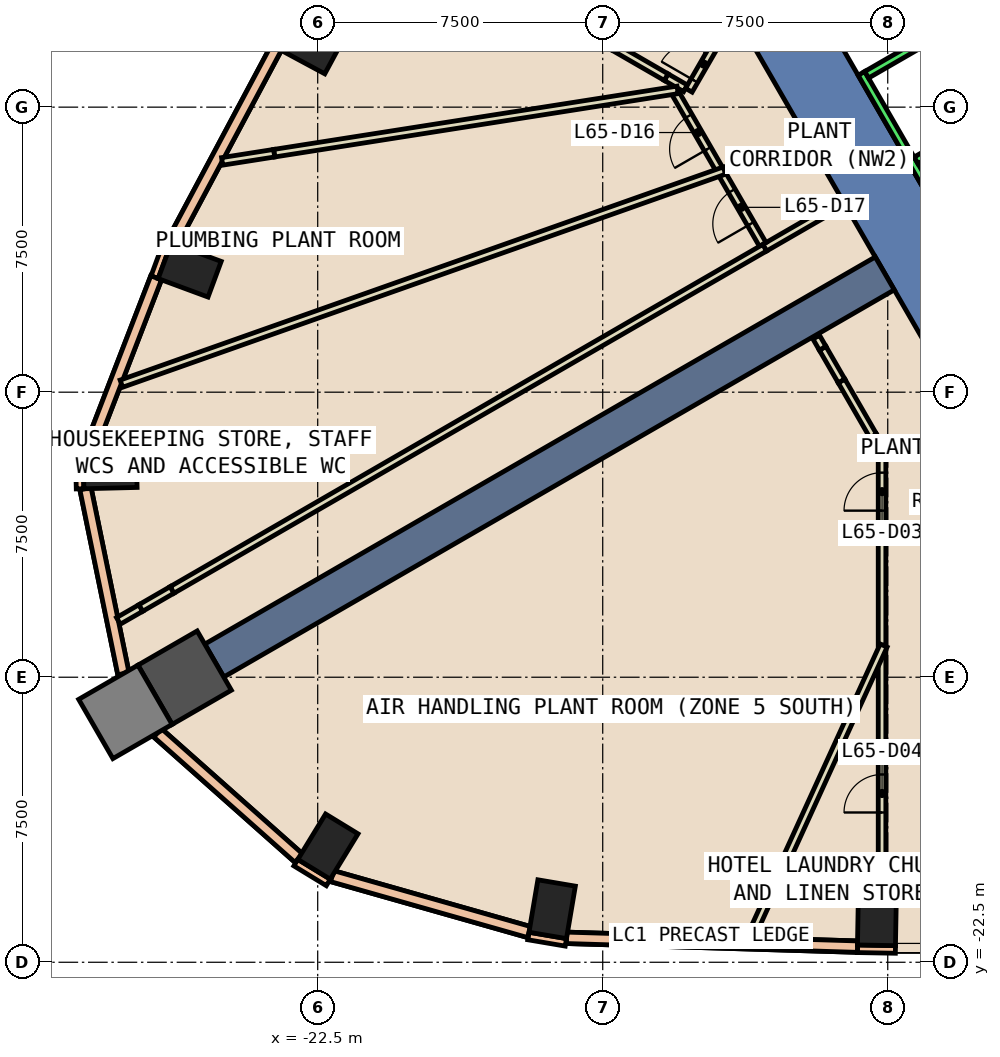
"""IFC4 building model, lengths in metres.
Left out: names, types, materials, properties, quantities, classifications, styles, units other than length and angle.
Written with IfcOpenShell. Run it as: python <this file> out.ifc"""

import sys

from ifc_helpers import new_model, si_unit, direction, frame, frame_2d, origin, origin_2d, place, context, subcontext, project, spatial, polyline, rectangle, outline, extrude, element, fill, save


model = new_model("IFC4")
c1 = context("Model", 3, precision=1e-05, world=origin(), true_north=direction((0.0, 1.0)))
c2 = subcontext(c1, "Body", "Model", "MODEL_VIEW")
j1 = project(units=[si_unit("LENGTHUNIT", "METRE"), si_unit("PLANEANGLEUNIT", "RADIAN")], contexts=[c1])
p1 = place(None, origin())
s1 = spatial("IfcSite", under=j1, at=p1, CompositionType="ELEMENT")
p2 = place(p1, origin())
s2 = spatial("IfcBuilding", under=s1, at=p2, CompositionType="ELEMENT")
p3 = place(p2, frame((0.0, 0.0, 281.0)))
s3 = spatial("IfcBuildingStorey", under=s2, at=p3, CompositionType="ELEMENT", Elevation=281.0)
for number, where, z_axis, x_axis in (
    (1, (-16.33, -21.104, -0.6), (0.0, 0.0, 1.0), (-0.986, 0.167, 0.0)),
    (2, (-7.784, -21.354, -0.6), (0.0, 0.0, 1.0), (-1.0, 0.018, 0.0)),
    (3, (-22.693, 1.649, -0.6), (0.0, 0.0, 1.0), (0.474, 0.881, 0.0)),
    (4, (-25.869, -4.285, -0.6), (0.0, 0.0, 1.0), (0.347, 0.938, 0.0)),
    (5, (-27.965, -9.524, -0.6), (0.0, 0.0, 1.0), (-0.025, 1.0, 0.0)),
):
    element("IfcColumn", number, at=place(p3, frame(where, z_axis=z_axis, x_axis=x_axis)), inside=s3, PredefinedType="COLUMN", context=c2, shape_type="SweptSolid", body=[
        extrude(rectangle(XDim=1.0, YDim=1.4, at=origin_2d()), origin(), (0.0, 0.0, 1.0), 5.4),
    ])
p4 = place(p3, frame((-26.001, -15.012, -0.6), z_axis=(0.0, 0.0, 1.0), x_axis=(0.866025403784, 0.5, 0.0)))
e6 = element("IfcColumn", 6, at=p4, inside=s3, PredefinedType="COLUMN", context=c2, shape_type="SweptSolid", body=[
    extrude(rectangle(XDim=1.8, YDim=1.8, at=origin_2d()), origin(), (0.0, 0.0, 1.0), 5.4),
])
p5 = place(p3, frame((-22.231, -19.457, -0.6), z_axis=(0.0, 0.0, 1.0), x_axis=(-0.853341581839, 0.521352227103, 0.0)))
e7 = element("IfcColumn", 7, at=p5, inside=s3, PredefinedType="COLUMN", context=c2, shape_type="SweptSolid", body=[
    extrude(rectangle(XDim=1.0, YDim=1.4, at=origin_2d()), origin(), (0.0, 0.0, 1.0), 5.4),
])
p6 = place(p3, frame((-27.56, -15.912, -0.6), z_axis=(0.0, 0.0, 1.0), x_axis=(0.866025403784, 0.5, 0.0)))
e8 = element("IfcColumn", 8, at=p6, inside=s3, PredefinedType="COLUMN", context=c2, shape_type="SweptSolid", body=[
    extrude(rectangle(XDim=1.8, YDim=1.8, at=origin_2d()), origin(), (0.0, 0.0, 1.0), 5.4),
])
p7 = place(p3, frame((0.0, 0.0, -0.6)))
e9 = element("IfcWall", 9, at=p7, inside=s3, PredefinedType="SHEAR", context=c2, shape_type="SweptSolid", body=[
    extrude(outline(polyline([(-11.547, 2.5), (-5.774, -7.5), (-4.619, -5.5), (-9.238, 2.5), (-11.547, 2.5)])), origin(), (0.0, 0.0, 1.0), 5.4),
])
p8 = place(p3, frame((-7.578, -4.375, 0.0), z_axis=(0.0, 0.0, 1.0), x_axis=(-0.866020754303, -0.500008053052, 0.0)))
e10 = element("IfcWall", 10, at=p8, inside=s3, PredefinedType="SHEAR", context=c2, shape_type="SweptSolid", body=[
    extrude(rectangle(XDim=20.374, YDim=1.0, at=frame_2d((10.187, 0.0))), origin(), (0.0, 0.0, 1.0), 4.8),
])
p9 = place(p3, frame((-26.446, -3.539, 0.0), z_axis=(0.0, 0.0, 1.0), x_axis=(-0.346892928577, -0.937904737222, 0.0)))
e11 = element("IfcWall", 11, at=p9, inside=s3, PredefinedType="STANDARD", context=c2, shape_type="SweptSolid", body=[
    extrude(rectangle(XDim=1.0, YDim=0.2, at=frame_2d((0.5, 0.0))), origin(), (0.0, 0.0, 1.0), 4.8),
])
for number, where, z_axis, x_axis in (
    (12, (-16.956, -21.809, 0.0), (0.0, 0.0, 1.0), (0.986, -0.167, 0.0)),
    (13, (-8.298, -22.145, 0.0), (0.0, 0.0, 1.0), (1.0, -0.018, 0.0)),
):
    element("IfcWall", number, at=place(p3, frame(where, z_axis=z_axis, x_axis=x_axis)), inside=s3, PredefinedType="STANDARD", context=c2, shape_type="SweptSolid", body=[
        extrude(rectangle(XDim=1.0, YDim=0.2, at=frame_2d((0.5, 0.0))), origin(), (0.0, 0.0, 1.0), 4.8),
    ])
p10 = place(p3, frame((-28.777, -9.044, 0.0), z_axis=(0.0, 0.0, 1.0), x_axis=(0.024186470916, -0.999707464524, 0.0)))
e14 = element("IfcWall", 14, at=p10, inside=s3, PredefinedType="STANDARD", context=c2, shape_type="SweptSolid", body=[
    extrude(rectangle(XDim=0.999, YDim=0.2, at=frame_2d((0.5, 0.0))), origin(), (0.0, 0.0, 1.0), 4.8),
])
p11 = place(p3, frame((-23.075, -19.879, 0.0), z_axis=(0.0, 0.0, 1.0), x_axis=(0.853679739553, -0.520798331677, 0.0)))
e15 = element("IfcWall", 15, at=p11, inside=s3, PredefinedType="STANDARD", context=c2, shape_type="SweptSolid", body=[
    extrude(rectangle(XDim=1.0, YDim=0.2, at=frame_2d((0.5, 0.0))), origin(), (0.0, 0.0, 1.0), 4.8),
])
p12 = place(p3, frame((-15.951, -21.857, 0.0), z_axis=(0.0, 0.0, 1.0), x_axis=(0.999540359891, -0.030316149968, 0.0)))
e16 = element("IfcWall", 16, at=p12, inside=s3, PredefinedType="STANDARD", context=c2, shape_type="SweptSolid", body=[
    extrude(rectangle(XDim=7.658, YDim=0.3, at=frame_2d((3.829, 0.0))), origin(), (0.0, 0.0, 1.0), 1.2),
])
p13 = place(p3, frame((-15.951, -21.857, 4.0), z_axis=(0.0, 0.0, 1.0), x_axis=(0.999540359891, -0.030316149968, 0.0)))
e17 = element("IfcWall", 17, at=p13, inside=s3, PredefinedType="STANDARD", context=c2, shape_type="SweptSolid", body=[
    extrude(rectangle(XDim=7.658, YDim=0.3, at=frame_2d((3.829, 0.0))), origin(), (0.0, 0.0, 1.0), 0.8),
])
p14 = place(p3, frame((-23.588, 1.565, 0.0), z_axis=(0.0, 0.0, 1.0), x_axis=(-0.470796778214, -0.882241686628, 0.0)))
e18 = element("IfcWall", 18, at=p14, inside=s3, PredefinedType="STANDARD", context=c2, shape_type="SweptSolid", body=[
    extrude(rectangle(XDim=5.833, YDim=0.3, at=frame_2d((2.917, 0.0))), origin(), (0.0, 0.0, 1.0), 1.2),
])
p15 = place(p3, frame((-23.588, 1.565, 4.0), z_axis=(0.0, 0.0, 1.0), x_axis=(-0.470796778214, -0.882241686628, 0.0)))
e19 = element("IfcWall", 19, at=p15, inside=s3, PredefinedType="STANDARD", context=c2, shape_type="SweptSolid", body=[
    extrude(rectangle(XDim=5.833, YDim=0.3, at=frame_2d((2.917, 0.0))), origin(), (0.0, 0.0, 1.0), 0.8),
])
p16 = place(p3, frame((-26.752, -4.491, 0.0), z_axis=(0.0, 0.0, 1.0), x_axis=(-0.360267544186, -0.932849021335, 0.0)))
e20 = element("IfcWall", 20, at=p16, inside=s3, PredefinedType="STANDARD", context=c2, shape_type="SweptSolid", body=[
    extrude(rectangle(XDim=4.875, YDim=0.3, at=frame_2d((2.437, 0.0))), origin(), (0.0, 0.0, 1.0), 1.2),
])
p17 = place(p3, frame((-26.752, -4.491, 4.0), z_axis=(0.0, 0.0, 1.0), x_axis=(-0.360267544186, -0.932849021335, 0.0)))
e21 = element("IfcWall", 21, at=p17, inside=s3, PredefinedType="STANDARD", context=c2, shape_type="SweptSolid", body=[
    extrude(rectangle(XDim=4.875, YDim=0.3, at=frame_2d((2.437, 0.0))), origin(), (0.0, 0.0, 1.0), 0.8),
])
p18 = place(p3, frame((-28.611, -10.039, 0.0), z_axis=(0.0, 0.0, 1.0), x_axis=(0.200924793816, -0.979606669654, 0.0)))
e22 = element("IfcWall", 22, at=p18, inside=s3, PredefinedType="STANDARD", context=c2, shape_type="SweptSolid", body=[
    extrude(rectangle(XDim=4.967, YDim=0.3, at=frame_2d((2.484, 0.0))), origin(), (0.0, 0.0, 1.0), 1.2),
])
p19 = place(p3, frame((-28.611, -10.039, 4.0), z_axis=(0.0, 0.0, 1.0), x_axis=(0.200924793816, -0.979606669654, 0.0)))
e23 = element("IfcWall", 23, at=p19, inside=s3, PredefinedType="STANDARD", context=c2, shape_type="SweptSolid", body=[
    extrude(rectangle(XDim=4.967, YDim=0.3, at=frame_2d((2.484, 0.0))), origin(), (0.0, 0.0, 1.0), 0.8),
])
p20 = place(p3, frame((-26.714, -16.462, 0.0), z_axis=(0.0, 0.0, 1.0), x_axis=(0.747938022937, -0.663768569492, 0.0)))
e24 = element("IfcWall", 24, at=p20, inside=s3, PredefinedType="STANDARD", context=c2, shape_type="SweptSolid", body=[
    extrude(rectangle(XDim=4.966, YDim=0.3, at=frame_2d((2.483, 0.0))), origin(), (0.0, 0.0, 1.0), 1.2),
])
p21 = place(p3, frame((-26.714, -16.462, 4.0), z_axis=(0.0, 0.0, 1.0), x_axis=(0.747938022937, -0.663768569492, 0.0)))
e25 = element("IfcWall", 25, at=p21, inside=s3, PredefinedType="STANDARD", context=c2, shape_type="SweptSolid", body=[
    extrude(rectangle(XDim=4.966, YDim=0.3, at=frame_2d((2.483, 0.0))), origin(), (0.0, 0.0, 1.0), 0.8),
])
p22 = place(p3, frame((-22.12, -20.234, 0.0), z_axis=(0.0, 0.0, 1.0), x_axis=(0.961984350903, -0.27310457451, 0.0)))
e26 = element("IfcWall", 26, at=p22, inside=s3, PredefinedType="STANDARD", context=c2, shape_type="SweptSolid", body=[
    extrude(rectangle(XDim=5.387, YDim=0.3, at=frame_2d((2.693, 0.0))), origin(), (0.0, 0.0, 1.0), 1.2),
])
p23 = place(p3, frame((-22.12, -20.234, 4.0), z_axis=(0.0, 0.0, 1.0), x_axis=(0.961984350903, -0.27310457451, 0.0)))
e27 = element("IfcWall", 27, at=p23, inside=s3, PredefinedType="STANDARD", context=c2, shape_type="SweptSolid", body=[
    extrude(rectangle(XDim=5.387, YDim=0.3, at=frame_2d((2.693, 0.0))), origin(), (0.0, 0.0, 1.0), 0.8),
])
p24 = place(p3, frame((-7.65, -14.157, 0.0), z_axis=(0.0, 0.0, 1.0), x_axis=(0.0, 1.0, 0.0)))
e28 = element("IfcWall", 28, at=p24, inside=s3, PredefinedType="PARTITIONING", context=c2, shape_type="SweptSolid", body=[
    extrude(rectangle(XDim=5.206, YDim=0.2, at=frame_2d((2.603, 0.0))), origin(), (0.0, 0.0, 1.0), 4.8),
])
p25 = place(p24, frame((3.54, 0.0, 0.0)))
e29 = element("IfcOpeningElement", 29, at=p25, cuts=e28, PredefinedType="OPENING", context=c2, shape_type="SweptSolid", body=[
    extrude(rectangle(XDim=1.0, YDim=2.1, at=frame_2d((0.5, 1.05))), frame((0.0, 0.11, 0.0), z_axis=(0.0, -1.0, 0.0), x_axis=(1.0, 0.0, 0.0)), (0.0, 0.0, 1.0), 0.22),
])
p26 = place(p3, frame((-7.7, -8.965, 0.0), z_axis=(0.0, 0.0, 1.0), x_axis=(-0.49946991135, 0.866331234376, 0.0)))
e30 = element("IfcWall", 30, at=p26, inside=s3, PredefinedType="PARTITIONING", context=c2, shape_type="SweptSolid", body=[
    extrude(rectangle(XDim=0.363, YDim=0.2, at=frame_2d((0.181, 0.0))), origin(), (0.0, 0.0, 1.0), 2.4),
])
p27 = place(p3, frame((-7.65, -20.636, 0.0), z_axis=(0.0, 0.0, 1.0), x_axis=(0.0, 1.0, 0.0)))
e31 = element("IfcWall", 31, at=p27, inside=s3, PredefinedType="PARTITIONING", context=c2, shape_type="SweptSolid", body=[
    extrude(rectangle(XDim=6.279, YDim=0.2, at=frame_2d((3.14, 0.0))), origin(), (0.0, 0.0, 1.0), 4.8),
])
p28 = place(p27, frame((2.077, 0.0, 0.0)))
e32 = element("IfcOpeningElement", 32, at=p28, cuts=e31, PredefinedType="OPENING", context=c2, shape_type="SweptSolid", body=[
    extrude(rectangle(XDim=1.0, YDim=2.1, at=frame_2d((0.5, 1.05))), frame((0.0, 0.11, 0.0), z_axis=(0.0, -1.0, 0.0), x_axis=(1.0, 0.0, 0.0)), (0.0, 0.0, 1.0), 0.22),
])
p29 = place(p3, frame((-7.608, -14.166, 0.0), z_axis=(0.0, 0.0, 1.0), x_axis=(-0.415367833022, -0.909653540251, 0.0)))
e33 = element("IfcWall", 33, at=p29, inside=s3, PredefinedType="PARTITIONING", context=c2, shape_type="SweptSolid", body=[
    extrude(rectangle(XDim=7.273, YDim=0.2, at=frame_2d((3.636, 0.0))), origin(), (0.0, 0.0, 1.0), 4.8),
])
p30 = place(p3, frame((-8.66, -2.5, 0.0), z_axis=(0.0, 0.0, 1.0), x_axis=(-0.866100915363, -0.499869187296, 0.0)))
e34 = element("IfcWall", 34, at=p30, inside=s3, PredefinedType="PARTITIONING", context=c2, shape_type="SweptSolid", body=[
    extrude(rectangle(XDim=2.401, YDim=0.2, at=frame_2d((1.2, 0.0))), origin(), (0.0, 0.0, 1.0), 4.8),
])
p31 = place(p3, frame((-27.744, -13.518, 0.0), z_axis=(0.0, 0.0, 1.0), x_axis=(0.866316887664, 0.499494794916, 0.0)))
e35 = element("IfcWall", 35, at=p31, inside=s3, PredefinedType="PARTITIONING", context=c2, shape_type="SweptSolid", body=[
    extrude(rectangle(XDim=0.681, YDim=0.2, at=frame_2d((0.34, 0.0))), origin(), (0.0, 0.0, 1.0), 4.8),
])
p32 = place(p3, frame((-13.331, 0.789, 0.0), z_axis=(0.0, 0.0, 1.0), x_axis=(0.866399552997, -0.499351393877, 0.0)))
e36 = element("IfcWall", 36, at=p32, inside=s3, PredefinedType="PARTITIONING", context=c2, shape_type="SweptSolid", body=[
    extrude(rectangle(XDim=0.589, YDim=0.2, at=frame_2d((0.294, 0.0))), origin(), (0.0, 0.0, 1.0), 4.8),
])
p33 = place(p3, frame((-12.734, 0.445, 0.0), z_axis=(0.0, 0.0, 1.0), x_axis=(0.500083740326, 0.865977050886, 0.0)))
e37 = element("IfcWall", 37, at=p33, inside=s3, PredefinedType="PARTITIONING", context=c2, shape_type="SweptSolid", body=[
    extrude(rectangle(XDim=2.203, YDim=0.2, at=frame_2d((1.102, 0.0))), origin(), (0.0, 0.0, 1.0), 4.8),
])
p34 = place(p33, frame((0.292, 0.0, 0.0)))
e38 = element("IfcOpeningElement", 38, at=p34, cuts=e37, PredefinedType="OPENING", context=c2, shape_type="SweptSolid", body=[
    extrude(rectangle(XDim=1.0, YDim=2.1, at=frame_2d((0.5, 1.05))), frame((0.0, 0.11, 0.0), z_axis=(0.0, -1.0, 0.0), x_axis=(1.0, 0.0, 0.0)), (0.0, 0.0, 1.0), 0.22),
])
p35 = place(p3, frame((-13.331, 0.79, 0.0), z_axis=(0.0, 0.0, 1.0), x_axis=(-0.866003733444, 0.500037532253, 0.0)))
e39 = element("IfcWall", 39, at=p35, inside=s3, PredefinedType="PARTITIONING", context=c2, shape_type="SweptSolid", body=[
    extrude(rectangle(XDim=1.61, YDim=0.2, at=frame_2d((0.805, 0.0))), origin(), (0.0, 0.0, 1.0), 4.8),
])
p36 = place(p3, frame((-11.893, -1.702, 0.0), z_axis=(0.0, 0.0, 1.0), x_axis=(-0.499941887998, 0.866058952165, 0.0)))
e40 = element("IfcWall", 40, at=p36, inside=s3, PredefinedType="PARTITIONING", context=c2, shape_type="SweptSolid", body=[
    extrude(rectangle(XDim=2.472, YDim=0.2, at=frame_2d((1.236, 0.0))), origin(), (0.0, 0.0, 1.0), 4.8),
])
p37 = place(p36, frame((0.694, 0.0, 0.0)))
e41 = element("IfcOpeningElement", 41, at=p37, cuts=e40, PredefinedType="OPENING", context=c2, shape_type="SweptSolid", body=[
    extrude(rectangle(XDim=1.0, YDim=2.1, at=frame_2d((0.5, 1.05))), frame((0.0, 0.11, 0.0), z_axis=(0.0, -1.0, 0.0), x_axis=(1.0, 0.0, 0.0)), (0.0, 0.0, 1.0), 0.22),
])
p38 = place(p3, frame((-10.789, -3.613, 0.0), z_axis=(0.0, 0.0, 1.0), x_axis=(-0.500207565094, 0.865905532852, 0.0)))
e42 = element("IfcWall", 42, at=p38, inside=s3, PredefinedType="PARTITIONING", context=c2, shape_type="SweptSolid", body=[
    extrude(rectangle(XDim=2.207, YDim=0.2, at=frame_2d((1.104, 0.0))), origin(), (0.0, 0.0, 1.0), 4.8),
])
p39 = place(p38, frame((0.628, 0.0, 0.0)))
e43 = element("IfcOpeningElement", 43, at=p39, cuts=e42, PredefinedType="OPENING", context=c2, shape_type="SweptSolid", body=[
    extrude(rectangle(XDim=1.0, YDim=2.1, at=frame_2d((0.5, 1.05))), frame((0.0, 0.11, 0.0), z_axis=(0.0, -1.0, 0.0), x_axis=(1.0, 0.0, 0.0)), (0.0, 0.0, 1.0), 0.22),
])
p40 = place(p3, frame((-13.03, 0.454, 0.0), z_axis=(0.0, 0.0, 1.0), x_axis=(-0.987908611797, -0.155037333369, 0.0)))
e44 = element("IfcWall", 44, at=p40, inside=s3, PredefinedType="PARTITIONING", context=c2, shape_type="SweptSolid", body=[
    extrude(rectangle(XDim=10.746, YDim=0.2, at=frame_2d((5.373, 0.0))), origin(), (0.0, 0.0, 1.0), 4.8),
])
p41 = place(p3, frame((-11.798, -1.669, 0.0), z_axis=(0.0, 0.0, 1.0), x_axis=(-0.942869217573, -0.333163081018, 0.0)))
e45 = element("IfcWall", 45, at=p41, inside=s3, PredefinedType="PARTITIONING", context=c2, shape_type="SweptSolid", body=[
    extrude(rectangle(XDim=16.829, YDim=0.2, at=frame_2d((8.415, 0.0))), origin(), (0.0, 0.0, 1.0), 4.8),
])
p42 = place(p3, frame((-7.881, -8.651, 0.0), z_axis=(0.0, 0.0, 1.0), x_axis=(-0.499848974954, 0.866112580579, 0.0)))
e46 = element("IfcWall", 46, at=p42, inside=s3, PredefinedType="PARTITIONING", context=c2, shape_type="SweptSolid", body=[
    extrude(rectangle(XDim=1.67, YDim=0.2, at=frame_2d((0.835, 0.0))), origin(), (0.0, 0.0, 1.0), 4.8),
])
p43 = place(p3, frame((-8.716, -7.204, 0.0), z_axis=(0.0, 0.0, 1.0), x_axis=(-0.500183410155, 0.865919485983, 0.0)))
e47 = element("IfcWall", 47, at=p43, inside=s3, PredefinedType="PARTITIONING", context=c2, shape_type="SweptSolid", body=[
    extrude(rectangle(XDim=0.993, YDim=0.2, at=frame_2d((0.497, 0.0))), origin(), (0.0, 0.0, 1.0), 2.4),
])
p44 = place(p3, frame((-9.213, -6.344, 0.0), z_axis=(0.0, 0.0, 1.0), x_axis=(-0.500097243556, 0.865969252911, 0.0)))
e48 = element("IfcWall", 48, at=p44, inside=s3, PredefinedType="PARTITIONING", context=c2, shape_type="SweptSolid", body=[
    extrude(rectangle(XDim=0.338, YDim=0.2, at=frame_2d((0.169, 0.0))), origin(), (0.0, 0.0, 1.0), 4.8),
])
p45 = place(p3, frame((-10.629, -20.782, 0.0), z_axis=(0.0, 0.0, 1.0), x_axis=(-0.415333382395, -0.909669270377, 0.0)))
e49 = element("IfcWall", 49, at=p45, inside=s3, PredefinedType="PARTITIONING", context=c2, shape_type="SweptSolid", body=[
    extrude(rectangle(XDim=1.177, YDim=0.2, at=frame_2d((0.589, 0.0))), origin(), (0.0, 0.0, 1.0), 2.4),
])
p46 = place(p3, frame((-27.154, -13.178, 0.0), z_axis=(0.0, 0.0, 1.0), x_axis=(0.865607892982, 0.500722453668, 0.0)))
e50 = element("IfcWall", 50, at=p46, inside=s3, PredefinedType="PARTITIONING", context=c2, shape_type="SweptSolid", body=[
    extrude(rectangle(XDim=0.951, YDim=0.2, at=frame_2d((0.475, 0.0))), origin(), (0.0, 0.0, 1.0), 2.4),
])
p47 = place(p3, frame((-26.331, -12.702, 0.0), z_axis=(0.0, 0.0, 1.0), x_axis=(0.866028192525, 0.499995169729, 0.0)))
e51 = element("IfcWall", 51, at=p47, inside=s3, PredefinedType="PARTITIONING", context=c2, shape_type="SweptSolid", body=[
    extrude(rectangle(XDim=18.004, YDim=0.2, at=frame_2d((9.002, 0.0))), origin(), (0.0, 0.0, 1.0), 4.8),
])
p48 = place(p3, frame((-23.646, -1.212, 0.0), z_axis=(0.0, 0.0, 1.0), x_axis=(-0.987862829639, -0.155328779745, 0.0)))
e52 = element("IfcWall", 52, at=p48, inside=s3, PredefinedType="PARTITIONING", context=c2, shape_type="SweptSolid", body=[
    extrude(rectangle(XDim=1.385, YDim=0.2, at=frame_2d((0.692, 0.0))), origin(), (0.0, 0.0, 1.0), 2.4),
])
p49 = place(p3, frame((-8.192, 0.888, 0.0), z_axis=(0.0, 0.0, 1.0), x_axis=(0.500034260056, -0.866005622828, 0.0)))
e53 = element("IfcWall", 53, at=p49, inside=s3, PredefinedType="STANDARD", context=c2, shape_type="SweptSolid", body=[
    extrude(rectangle(XDim=5.399, YDim=0.2, at=frame_2d((2.7, 0.0))), origin(), (0.0, 0.0, 1.0), 4.8),
])
for number, where, z_axis, x_axis in (
    (54, (-5.977, 2.052, 0.0), (0.0, 0.0, 1.0), (-0.866, -0.5, 0.0)),
    (55, (-4.677, -0.2, 0.0), (0.0, 0.0, 1.0), (-0.866, -0.5, 0.0)),
):
    element("IfcWall", number, at=place(p3, frame(where, z_axis=z_axis, x_axis=x_axis)), inside=s3, PredefinedType="STANDARD", context=c2, shape_type="SweptSolid", body=[
        extrude(rectangle(XDim=2.399, YDim=0.2, at=frame_2d((1.2, 0.0))), origin(), (0.0, 0.0, 1.0), 4.8),
    ])
p50 = place(p25, origin())
e56 = element("IfcDoor", 56, at=p50, inside=s3, OperationType="SINGLE_SWING_RIGHT", PredefinedType="DOOR", context=c2, shape_type="SweptSolid", body=[
    extrude(rectangle(XDim=1.0, YDim=2.1, at=frame_2d((0.5, 1.05))), frame((0.0, 0.025, 0.0), z_axis=(0.0, -1.0, 0.0), x_axis=(1.0, 0.0, 0.0)), (0.0, 0.0, 1.0), 0.05),
])
fill(e29, e56)
p51 = place(p28, origin())
e57 = element("IfcDoor", 57, at=p51, inside=s3, OperationType="SINGLE_SWING_LEFT", PredefinedType="DOOR", context=c2, shape_type="SweptSolid", body=[
    extrude(rectangle(XDim=1.0, YDim=2.1, at=frame_2d((0.5, 1.05))), frame((0.0, 0.025, 0.0), z_axis=(0.0, -1.0, 0.0), x_axis=(1.0, 0.0, 0.0)), (0.0, 0.0, 1.0), 0.05),
])
fill(e32, e57)
p52 = place(p34, origin())
e58 = element("IfcDoor", 58, at=p52, inside=s3, OperationType="SINGLE_SWING_RIGHT", PredefinedType="DOOR", context=c2, shape_type="SweptSolid", body=[
    extrude(rectangle(XDim=1.0, YDim=2.1, at=frame_2d((0.5, 1.05))), frame((0.0, 0.025, 0.0), z_axis=(0.0, -1.0, 0.0), x_axis=(1.0, 0.0, 0.0)), (0.0, 0.0, 1.0), 0.05),
])
fill(e38, e58)
p53 = place(p37, origin())
e59 = element("IfcDoor", 59, at=p53, inside=s3, OperationType="SINGLE_SWING_LEFT", PredefinedType="DOOR", context=c2, shape_type="SweptSolid", body=[
    extrude(rectangle(XDim=1.0, YDim=2.1, at=frame_2d((0.5, 1.05))), frame((0.0, 0.025, 0.0), z_axis=(0.0, -1.0, 0.0), x_axis=(1.0, 0.0, 0.0)), (0.0, 0.0, 1.0), 0.05),
])
fill(e41, e59)
p54 = place(p39, origin())
e60 = element("IfcDoor", 60, at=p54, inside=s3, OperationType="SINGLE_SWING_RIGHT", PredefinedType="DOOR", context=c2, shape_type="SweptSolid", body=[
    extrude(rectangle(XDim=1.0, YDim=2.1, at=frame_2d((0.5, 1.05))), frame((0.0, 0.025, 0.0), z_axis=(0.0, -1.0, 0.0), x_axis=(1.0, 0.0, 0.0)), (0.0, 0.0, 1.0), 0.05),
])
fill(e43, e60)
save(model, sys.argv[1])
